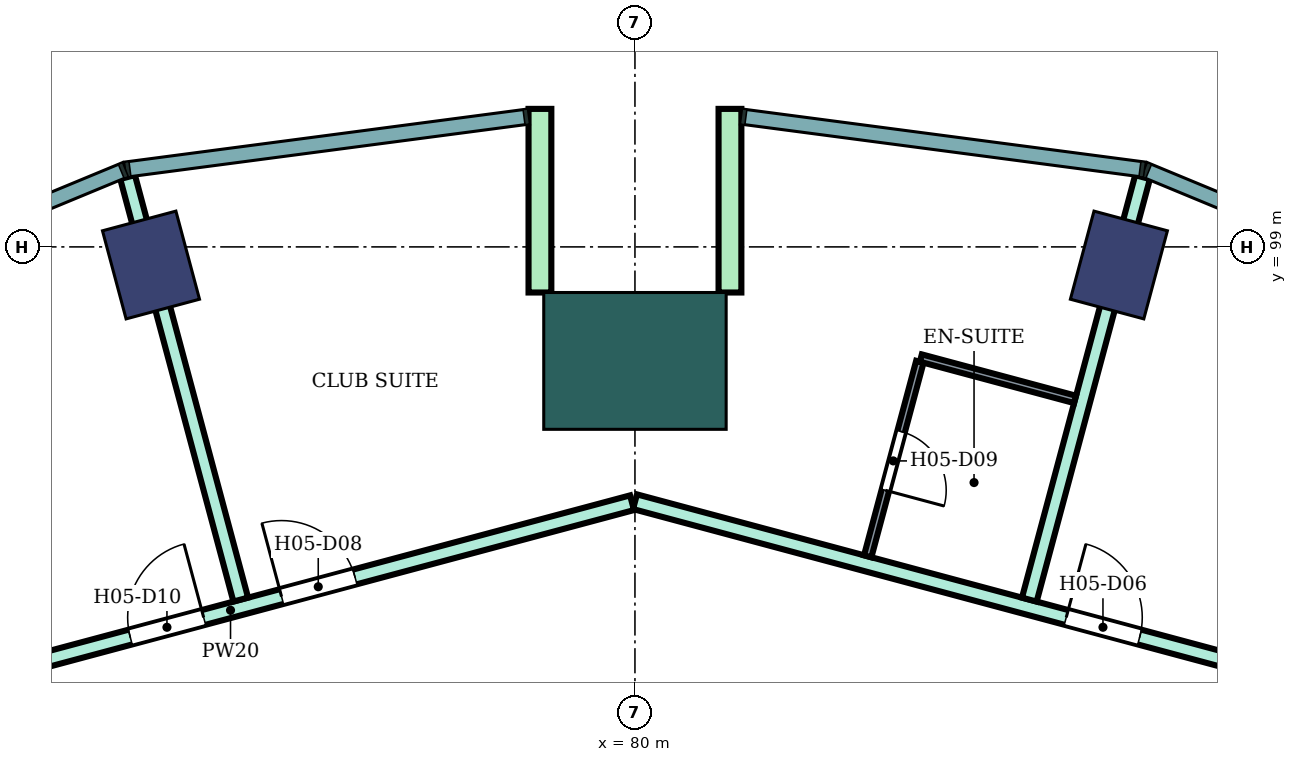
"""IFC4 building model, lengths in metres.
Left out: names, types, materials, properties, quantities, classifications, styles, units other than length and angle.
Written with IfcOpenShell. Run it as: python <this file> out.ifc"""

import sys

from ifc_helpers import new_model, si_unit, direction, frame, frame_2d, origin, origin_2d, place, context, subcontext, project, spatial, rectangle, extrude, element, fill, save


model = new_model("IFC4")
c1 = context("Model", 3, precision=1e-05, world=origin(), true_north=direction((0.0, 1.0)))
c2 = subcontext(c1, "Body", "Model", "MODEL_VIEW")
j1 = project(units=[si_unit("LENGTHUNIT", "METRE"), si_unit("PLANEANGLEUNIT", "RADIAN")], contexts=[c1])
p1 = place(None, origin())
s1 = spatial("IfcSite", under=j1, at=p1, CompositionType="ELEMENT")
p2 = place(p1, origin())
s2 = spatial("IfcBuilding", under=s1, at=p2, CompositionType="ELEMENT")
p3 = place(p2, frame((0.0, 0.0, 86.2)))
s3 = spatial("IfcBuildingStorey", under=s2, at=p3, CompositionType="ELEMENT", Elevation=86.2)
for number, where, z_axis, x_axis in (
    (1, (86.367, 98.762, 0.0), (0.0, 0.0, 1.0), (0.259, 0.966, 0.0)),
    (2, (73.633, 98.762, 0.0), (0.0, 0.0, 1.0), (-0.259, 0.966, 0.0)),
):
    element("IfcColumn", number, at=place(p3, frame(where, z_axis=z_axis, x_axis=x_axis)), inside=s3, PredefinedType="COLUMN", context=c2, shape_type="SweptSolid", body=[
        extrude(rectangle(XDim=1.2, YDim=1.0, at=origin_2d()), origin(), (0.0, 0.0, 1.0), 3.8),
    ])
p4 = place(p3, frame((80.0, 97.5, 0.0), z_axis=(0.0, 0.0, 1.0), x_axis=(0.0, 1.0, 0.0)))
e3 = element("IfcColumn", 3, at=p4, inside=s3, PredefinedType="COLUMN", context=c2, shape_type="SweptSolid", body=[
    extrude(rectangle(XDim=1.8, YDim=2.4, at=origin_2d()), origin(), (0.0, 0.0, 1.0), 3.8),
])
for number, where, z_axis, x_axis in (
    (4, (81.25, 98.4, 0.0), (0.0, 0.0, 1.0), (0.0, 1.0, 0.0)),
    (5, (78.75, 98.4, 0.0), (0.0, 0.0, 1.0), (0.0, 1.0, 0.0)),
):
    element("IfcWall", number, at=place(p3, frame(where, z_axis=z_axis, x_axis=x_axis)), inside=s3, PredefinedType="NOTDEFINED", context=c2, shape_type="SweptSolid", body=[
        extrude(rectangle(XDim=2.416, YDim=0.3, at=frame_2d((1.208, 0.0))), origin(), (0.0, 0.0, 1.0), 3.8),
    ])
p5 = place(p3, frame((69.397, 92.805, 0.0), z_axis=(0.0, 0.0, 1.0), x_axis=(0.96596468683, 0.258673972015, 0.0)))
e6 = element("IfcWall", 6, at=p5, inside=s3, PredefinedType="PARTITIONING", context=c2, shape_type="SweptSolid", body=[
    extrude(rectangle(XDim=10.937, YDim=0.2, at=frame_2d((5.469, 0.0))), origin(), (0.0, 0.0, 1.0), 3.35),
])
p6 = place(p5, frame((6.163, 0.0, 0.0)))
e7 = element("IfcOpeningElement", 7, at=p6, cuts=e6, PredefinedType="OPENING", context=c2, shape_type="SweptSolid", body=[
    extrude(rectangle(XDim=1.0, YDim=2.1, at=frame_2d((0.5, 1.05))), frame((0.0, 0.11, 0.0), z_axis=(0.0, -1.0, 0.0), x_axis=(1.0, 0.0, 0.0)), (0.0, 0.0, 1.0), 0.22),
])
p7 = place(p5, frame((4.103, 0.0, 0.0)))
e8 = element("IfcOpeningElement", 8, at=p7, cuts=e6, PredefinedType="OPENING", context=c2, shape_type="SweptSolid", body=[
    extrude(rectangle(XDim=1.0, YDim=2.1, at=frame_2d((0.5, 1.05))), frame((0.0, 0.11, 0.0), z_axis=(0.0, -1.0, 0.0), x_axis=(1.0, 0.0, 0.0)), (0.0, 0.0, 1.0), 0.22),
])
p8 = place(p3, frame((73.325, 99.919, 0.0), z_axis=(0.0, 0.0, 1.0), x_axis=(0.25871346471, -0.965954110286, 0.0)))
e9 = element("IfcWall", 9, at=p8, inside=s3, PredefinedType="PARTITIONING", context=c2, shape_type="SweptSolid", body=[
    extrude(rectangle(XDim=5.754, YDim=0.2, at=frame_2d((2.877, 0.0))), origin(), (0.0, 0.0, 1.0), 3.35),
])
p9 = place(p3, frame((80.0, 95.648, 0.0), z_axis=(0.0, 0.0, 1.0), x_axis=(0.965852259202, -0.259093445292, 0.0)))
e10 = element("IfcWall", 10, at=p9, inside=s3, PredefinedType="PARTITIONING", context=c2, shape_type="SweptSolid", body=[
    extrude(rectangle(XDim=10.597, YDim=0.2, at=frame_2d((5.298, 0.0))), origin(), (0.0, 0.0, 1.0), 3.35),
])
p10 = place(p9, frame((5.875, 0.0, 0.0)))
e11 = element("IfcOpeningElement", 11, at=p10, cuts=e10, PredefinedType="OPENING", context=c2, shape_type="SweptSolid", body=[
    extrude(rectangle(XDim=1.0, YDim=2.1, at=frame_2d((0.5, 1.05))), frame((0.0, 0.11, 0.0), z_axis=(0.0, -1.0, 0.0), x_axis=(1.0, 0.0, 0.0)), (0.0, 0.0, 1.0), 0.22),
])
p11 = place(p3, frame((85.188, 94.36, 0.0), z_axis=(0.0, 0.0, 1.0), x_axis=(0.258882407816, 0.965908846074, 0.0)))
e12 = element("IfcWall", 12, at=p11, inside=s3, PredefinedType="PARTITIONING", context=c2, shape_type="SweptSolid", body=[
    extrude(rectangle(XDim=5.755, YDim=0.2, at=frame_2d((2.877, 0.0))), origin(), (0.0, 0.0, 1.0), 3.35),
])
p12 = place(p3, frame((83.062, 94.929, 0.0), z_axis=(0.0, 0.0, 1.0), x_axis=(0.258889588814, 0.965906921398, 0.0)))
e13 = element("IfcWall", 13, at=p12, inside=s3, PredefinedType="PARTITIONING", context=c2, shape_type="SweptSolid", body=[
    extrude(rectangle(XDim=2.65, YDim=0.1, at=frame_2d((1.325, 0.0))), origin(), (0.0, 0.0, 1.0), 3.35),
])
p13 = place(p12, frame((0.9, 0.0, 0.0)))
e14 = element("IfcOpeningElement", 14, at=p13, cuts=e13, PredefinedType="OPENING", context=c2, shape_type="SweptSolid", body=[
    extrude(rectangle(XDim=0.8, YDim=2.1, at=frame_2d((0.4, 1.05))), frame((0.0, 0.06, 0.0), z_axis=(0.0, -1.0, 0.0), x_axis=(1.0, 0.0, 0.0)), (0.0, 0.0, 1.0), 0.12),
])
p14 = place(p3, frame((83.761, 97.538, 0.0), z_axis=(0.0, 0.0, 1.0), x_axis=(0.965871218513, -0.259022758166, 0.0)))
e15 = element("IfcWall", 15, at=p14, inside=s3, PredefinedType="PARTITIONING", context=c2, shape_type="SweptSolid", body=[
    extrude(rectangle(XDim=2.1, YDim=0.1, at=frame_2d((1.05, 0.0))), origin(), (0.0, 0.0, 1.0), 3.35),
])
p15 = place(p10, origin())
e16 = element("IfcDoor", 16, at=p15, inside=s3, OperationType="SINGLE_SWING_LEFT", PredefinedType="DOOR", context=c2, shape_type="SweptSolid", body=[
    extrude(rectangle(XDim=1.0, YDim=2.1, at=frame_2d((0.5, 1.05))), frame((0.0, 0.025, 0.0), z_axis=(0.0, -1.0, 0.0), x_axis=(1.0, 0.0, 0.0)), (0.0, 0.0, 1.0), 0.05),
])
fill(e11, e16)
p16 = place(p6, origin())
e17 = element("IfcDoor", 17, at=p16, inside=s3, OperationType="SINGLE_SWING_LEFT", PredefinedType="DOOR", context=c2, shape_type="SweptSolid", body=[
    extrude(rectangle(XDim=1.0, YDim=2.1, at=frame_2d((0.5, 1.05))), frame((0.0, 0.025, 0.0), z_axis=(0.0, -1.0, 0.0), x_axis=(1.0, 0.0, 0.0)), (0.0, 0.0, 1.0), 0.05),
])
fill(e7, e17)
p17 = place(p13, frame((0.8, 0.0, 0.0), z_axis=(0.0, 0.0, 1.0), x_axis=(-1.0, 0.0, 0.0)))
e18 = element("IfcDoor", 18, at=p17, inside=s3, OperationType="SINGLE_SWING_RIGHT", PredefinedType="DOOR", context=c2, shape_type="SweptSolid", body=[
    extrude(rectangle(XDim=0.8, YDim=2.1, at=frame_2d((0.4, 1.05))), frame((0.0, 0.025, 0.0), z_axis=(0.0, -1.0, 0.0), x_axis=(1.0, 0.0, 0.0)), (0.0, 0.0, 1.0), 0.05),
])
fill(e14, e18)
p18 = place(p7, origin())
e19 = element("IfcDoor", 19, at=p18, inside=s3, OperationType="SINGLE_SWING_RIGHT", PredefinedType="DOOR", context=c2, shape_type="SweptSolid", body=[
    extrude(rectangle(XDim=1.0, YDim=2.1, at=frame_2d((0.5, 1.05))), frame((0.0, 0.025, 0.0), z_axis=(0.0, -1.0, 0.0), x_axis=(1.0, 0.0, 0.0)), (0.0, 0.0, 1.0), 0.05),
])
fill(e8, e19)
save(model, sys.argv[1])
